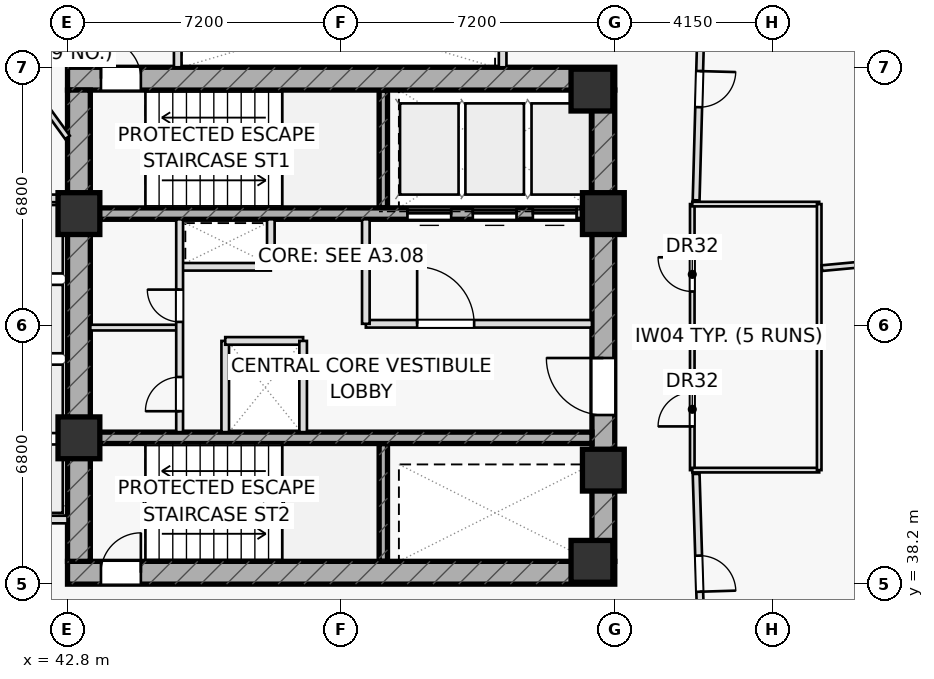
"""IFC4 building model, lengths in metres.
Left out: names, types, materials, properties, quantities, classifications, styles, units other than length and angle.
Written with IfcOpenShell. Run it as: python <this file> out.ifc"""

import sys

from ifc_helpers import new_model, si_unit, direction, frame, frame_2d, origin, origin_2d, place, context, subcontext, project, spatial, rectangle, extrude, element, fill, save


model = new_model("IFC4")
c1 = context("Model", 3, precision=1e-05, world=origin(), true_north=direction((0.0, 1.0)))
c2 = subcontext(c1, "Body", "Model", "MODEL_VIEW")
j1 = project(units=[si_unit("LENGTHUNIT", "METRE"), si_unit("PLANEANGLEUNIT", "RADIAN")], contexts=[c1])
p1 = place(None, origin())
s1 = spatial("IfcSite", under=j1, at=p1, CompositionType="ELEMENT")
p2 = place(p1, origin())
s2 = spatial("IfcBuilding", under=s1, at=p2, CompositionType="ELEMENT")
p3 = place(p2, frame((0.0, 0.0, 62.7)))
s3 = spatial("IfcBuildingStorey", under=s2, at=p3, CompositionType="ELEMENT", Elevation=62.7)
for number, where, z_axis, x_axis in (
    (1, (51.11, 48.1, 0.0), (0.0, 0.0, 1.0), (0.0, 1.0, 0.0)),
    (2, (51.11, 38.8, 0.0), (0.0, 0.0, 1.0), (0.0, 1.0, 0.0)),
):
    element("IfcWall", number, at=place(p3, frame(where, z_axis=z_axis, x_axis=x_axis)), inside=s3, PredefinedType="SHEAR", context=c2, shape_type="SweptSolid", body=[
        extrude(rectangle(XDim=3.1, YDim=0.22, at=frame_2d((1.55, 0.0))), origin(), (0.0, 0.0, 1.0), 3.6),
    ])
p4 = place(p3, frame((42.8, 51.5, 0.0), z_axis=(0.0, 0.0, 1.0), x_axis=(1.0, 0.0, 0.0)))
e3 = element("IfcWall", 3, at=p4, inside=s3, PredefinedType="SHEAR", context=c2, shape_type="SweptSolid", body=[
    extrude(rectangle(XDim=14.4, YDim=0.6, at=frame_2d((7.2, 0.0))), origin(), (0.0, 0.0, 1.0), 3.6),
])
p5 = place(p4, frame((0.88, 0.0, 0.0)))
e4 = element("IfcOpeningElement", 4, at=p5, cuts=e3, PredefinedType="OPENING", context=c2, shape_type="SweptSolid", body=[
    extrude(rectangle(XDim=1.05, YDim=2.2, at=frame_2d((0.525, 1.1))), frame((0.0, 0.31, 0.0), z_axis=(0.0, -1.0, 0.0), x_axis=(1.0, 0.0, 0.0)), (0.0, 0.0, 1.0), 0.62),
])
p6 = place(p3, frame((42.8, 38.5, 0.0), z_axis=(0.0, 0.0, 1.0), x_axis=(1.0, 0.0, 0.0)))
e5 = element("IfcWall", 5, at=p6, inside=s3, PredefinedType="SHEAR", context=c2, shape_type="SweptSolid", body=[
    extrude(rectangle(XDim=14.4, YDim=0.6, at=frame_2d((7.2, 0.0))), origin(), (0.0, 0.0, 1.0), 3.6),
])
p7 = place(p6, frame((0.88, 0.0, 0.0)))
e6 = element("IfcOpeningElement", 6, at=p7, cuts=e5, PredefinedType="OPENING", context=c2, shape_type="SweptSolid", body=[
    extrude(rectangle(XDim=1.05, YDim=2.2, at=frame_2d((0.525, 1.1))), frame((0.0, 0.31, 0.0), z_axis=(0.0, -1.0, 0.0), x_axis=(1.0, 0.0, 0.0)), (0.0, 0.0, 1.0), 0.62),
])
p8 = place(p3, frame((43.1, 38.8, 0.0), z_axis=(0.0, 0.0, 1.0), x_axis=(0.0, 1.0, 0.0)))
e7 = element("IfcWall", 7, at=p8, inside=s3, PredefinedType="SHEAR", context=c2, shape_type="SweptSolid", body=[
    extrude(rectangle(XDim=12.4, YDim=0.6, at=frame_2d((6.2, 0.0))), origin(), (0.0, 0.0, 1.0), 3.6),
])
p9 = place(p3, frame((56.9, 38.8, 0.0), z_axis=(0.0, 0.0, 1.0), x_axis=(0.0, 1.0, 0.0)))
e8 = element("IfcWall", 8, at=p9, inside=s3, PredefinedType="SHEAR", context=c2, shape_type="SweptSolid", body=[
    extrude(rectangle(XDim=12.4, YDim=0.6, at=frame_2d((6.2, 0.0))), origin(), (0.0, 0.0, 1.0), 3.6),
])
p10 = place(p9, frame((3.85, 0.0, 0.0)))
e9 = element("IfcOpeningElement", 9, at=p10, cuts=e8, PredefinedType="OPENING", context=c2, shape_type="SweptSolid", body=[
    extrude(rectangle(XDim=1.5, YDim=2.2, at=frame_2d((0.75, 1.1))), frame((0.0, 0.31, 0.0), z_axis=(0.0, -1.0, 0.0), x_axis=(1.0, 0.0, 0.0)), (0.0, 0.0, 1.0), 0.62),
])
p11 = place(p3, frame((43.4, 47.95, 0.0), z_axis=(0.0, 0.0, 1.0), x_axis=(1.0, 0.0, 0.0)))
e10 = element("IfcWall", 10, at=p11, inside=s3, PredefinedType="SHEAR", context=c2, shape_type="SweptSolid", body=[
    extrude(rectangle(XDim=13.2, YDim=0.3, at=frame_2d((6.6, 0.0))), origin(), (0.0, 0.0, 1.0), 3.6),
])
p12 = place(p11, frame((8.345, 0.0, 0.0)))
e11 = element("IfcOpeningElement", 11, at=p12, cuts=e10, PredefinedType="OPENING", context=c2, shape_type="SweptSolid", body=[
    extrude(rectangle(XDim=1.15, YDim=2.2, at=frame_2d((0.575, 1.1))), frame((0.0, 0.16, 0.0), z_axis=(0.0, -1.0, 0.0), x_axis=(1.0, 0.0, 0.0)), (0.0, 0.0, 1.0), 0.32),
])
p13 = place(p11, frame((10.065, 0.0, 0.0)))
e12 = element("IfcOpeningElement", 12, at=p13, cuts=e10, PredefinedType="OPENING", context=c2, shape_type="SweptSolid", body=[
    extrude(rectangle(XDim=1.15, YDim=2.2, at=frame_2d((0.575, 1.1))), frame((0.0, 0.16, 0.0), z_axis=(0.0, -1.0, 0.0), x_axis=(1.0, 0.0, 0.0)), (0.0, 0.0, 1.0), 0.32),
])
p14 = place(p11, frame((11.645, 0.0, 0.0)))
e13 = element("IfcOpeningElement", 13, at=p14, cuts=e10, PredefinedType="OPENING", context=c2, shape_type="SweptSolid", body=[
    extrude(rectangle(XDim=1.15, YDim=2.2, at=frame_2d((0.575, 1.1))), frame((0.0, 0.16, 0.0), z_axis=(0.0, -1.0, 0.0), x_axis=(1.0, 0.0, 0.0)), (0.0, 0.0, 1.0), 0.32),
])
p15 = place(p3, frame((43.4, 42.05, 0.0), z_axis=(0.0, 0.0, 1.0), x_axis=(1.0, 0.0, 0.0)))
e14 = element("IfcWall", 14, at=p15, inside=s3, PredefinedType="SHEAR", context=c2, shape_type="SweptSolid", body=[
    extrude(rectangle(XDim=13.2, YDim=0.3, at=frame_2d((6.6, 0.0))), origin(), (0.0, 0.0, 1.0), 3.6),
])
for number, where, z_axis, x_axis in (
    (15, (43.1, 47.95, 0.0), (0.0, 0.0, 1.0), (1.0, 0.0, 0.0)),
    (16, (56.9, 47.95, 0.0), (0.0, 0.0, 1.0), (1.0, 0.0, 0.0)),
    (17, (56.6, 51.2, 0.0), (0.0, 0.0, 1.0), (1.0, 0.0, 0.0)),
    (18, (43.1, 42.05, 0.0), (0.0, 0.0, 1.0), (1.0, 0.0, 0.0)),
    (19, (56.9, 41.2, 0.0), (0.0, 0.0, 1.0), (1.0, 0.0, 0.0)),
    (20, (56.6, 38.8, 0.0), (0.0, 0.0, 1.0), (1.0, 0.0, 0.0)),
):
    element("IfcColumn", number, at=place(p3, frame(where, z_axis=z_axis, x_axis=x_axis)), inside=s3, PredefinedType="COLUMN", context=c2, shape_type="SweptSolid", body=[
        extrude(rectangle(XDim=1.1, YDim=1.1, at=origin_2d()), origin(), (0.0, 0.0, 1.0), 3.6),
    ])
for number, where, z_axis, x_axis in (
    (21, (40.3, 39.9, 0.0), (0.0, 0.0, 1.0), (1.0, 0.0, 0.0)),
    (22, (40.3, 48.35, 0.0), (0.0, 0.0, 1.0), (1.0, 0.0, 0.0)),
    (23, (45.7, 51.8, 0.0), (0.0, 0.0, 1.0), (0.0, 1.0, 0.0)),
    (24, (54.25, 51.8, 0.0), (0.0, 0.0, 1.0), (0.0, 1.0, 0.0)),
):
    element("IfcWall", number, at=place(p3, frame(where, z_axis=z_axis, x_axis=x_axis)), inside=s3, PredefinedType="PARTITIONING", context=c2, shape_type="SweptSolid", body=[
        extrude(rectangle(XDim=2.5, YDim=0.2, at=frame_2d((1.25, 0.0))), origin(), (0.0, 0.0, 1.0), 3.6),
    ])
p16 = place(p3, frame((45.75, 46.55, 0.0), z_axis=(0.0, 0.0, 1.0), x_axis=(1.0, 0.0, 0.0)))
e25 = element("IfcWall", 25, at=p16, inside=s3, PredefinedType="PARTITIONING", context=c2, shape_type="SweptSolid", body=[
    extrude(rectangle(XDim=2.4, YDim=0.2, at=frame_2d((1.2, 0.0))), origin(), (0.0, 0.0, 1.0), 3.6),
])
p17 = place(p3, frame((48.15, 46.55, 0.0), z_axis=(0.0, 0.0, 1.0), x_axis=(0.0, 1.0, 0.0)))
e26 = element("IfcWall", 26, at=p17, inside=s3, PredefinedType="PARTITIONING", context=c2, shape_type="SweptSolid", body=[
    extrude(rectangle(XDim=1.25, YDim=0.2, at=frame_2d((0.625, 0.0))), origin(), (0.0, 0.0, 1.0), 3.6),
])
p18 = place(p3, frame((46.95, 42.2, 0.0), z_axis=(0.0, 0.0, 1.0), x_axis=(0.0, 1.0, 0.0)))
e27 = element("IfcWall", 27, at=p18, inside=s3, PredefinedType="PARTITIONING", context=c2, shape_type="SweptSolid", body=[
    extrude(rectangle(XDim=2.4, YDim=0.2, at=frame_2d((1.2, 0.0))), origin(), (0.0, 0.0, 1.0), 3.6),
])
p19 = place(p3, frame((46.95, 44.6, 0.0), z_axis=(0.0, 0.0, 1.0), x_axis=(1.0, 0.0, 0.0)))
e28 = element("IfcWall", 28, at=p19, inside=s3, PredefinedType="PARTITIONING", context=c2, shape_type="SweptSolid", body=[
    extrude(rectangle(XDim=2.05, YDim=0.2, at=frame_2d((1.025, 0.0))), origin(), (0.0, 0.0, 1.0), 3.6),
])
p20 = place(p3, frame((50.65, 45.05, 0.0), z_axis=(0.0, 0.0, 1.0), x_axis=(1.0, 0.0, 0.0)))
e29 = element("IfcWall", 29, at=p20, inside=s3, PredefinedType="PARTITIONING", context=c2, shape_type="SweptSolid", body=[
    extrude(rectangle(XDim=5.95, YDim=0.2, at=frame_2d((2.975, 0.0))), origin(), (0.0, 0.0, 1.0), 3.6),
])
p21 = place(p20, frame((1.35, 0.0, 0.0)))
e30 = element("IfcOpeningElement", 30, at=p21, cuts=e29, PredefinedType="OPENING", context=c2, shape_type="SweptSolid", body=[
    extrude(rectangle(XDim=1.5, YDim=2.2, at=frame_2d((0.75, 1.1))), frame((0.0, 0.11, 0.0), z_axis=(0.0, -1.0, 0.0), x_axis=(1.0, 0.0, 0.0)), (0.0, 0.0, 1.0), 0.22),
])
p22 = place(p3, frame((50.65, 45.05, 0.0), z_axis=(0.0, 0.0, 1.0), x_axis=(0.0, 1.0, 0.0)))
e31 = element("IfcWall", 31, at=p22, inside=s3, PredefinedType="PARTITIONING", context=c2, shape_type="SweptSolid", body=[
    extrude(rectangle(XDim=2.75, YDim=0.2, at=frame_2d((1.375, 0.0))), origin(), (0.0, 0.0, 1.0), 3.6),
])
p23 = place(p3, frame((43.4, 44.95, 0.0), z_axis=(0.0, 0.0, 1.0), x_axis=(1.0, 0.0, 0.0)))
e32 = element("IfcWall", 32, at=p23, inside=s3, PredefinedType="PARTITIONING", context=c2, shape_type="SweptSolid", body=[
    extrude(rectangle(XDim=2.35, YDim=0.15, at=frame_2d((1.175, 0.0))), origin(), (0.0, 0.0, 1.0), 3.6),
])
p24 = place(p3, frame((45.75, 42.2, 0.0), z_axis=(0.0, 0.0, 1.0), x_axis=(0.0, 1.0, 0.0)))
e33 = element("IfcWall", 33, at=p24, inside=s3, PredefinedType="PARTITIONING", context=c2, shape_type="SweptSolid", body=[
    extrude(rectangle(XDim=5.6, YDim=0.18, at=frame_2d((2.8, 0.0))), origin(), (0.0, 0.0, 1.0), 3.6),
])
p25 = place(p24, frame((0.55, 0.0, 0.0)))
e34 = element("IfcOpeningElement", 34, at=p25, cuts=e33, PredefinedType="OPENING", context=c2, shape_type="SweptSolid", body=[
    extrude(rectangle(XDim=0.9, YDim=2.05, at=frame_2d((0.45, 1.025))), frame((0.0, 0.1, 0.0), z_axis=(0.0, -1.0, 0.0), x_axis=(1.0, 0.0, 0.0)), (0.0, 0.0, 1.0), 0.2),
])
p26 = place(p24, frame((2.9, 0.0, 0.0)))
e35 = element("IfcOpeningElement", 35, at=p26, cuts=e33, PredefinedType="OPENING", context=c2, shape_type="SweptSolid", body=[
    extrude(rectangle(XDim=0.85, YDim=2.05, at=frame_2d((0.425, 1.025))), frame((0.0, 0.1, 0.0), z_axis=(0.0, -1.0, 0.0), x_axis=(1.0, 0.0, 0.0)), (0.0, 0.0, 1.0), 0.2),
])
p27 = place(p3, frame((59.24, 41.2, 0.0), z_axis=(0.0, 0.0, 1.0), x_axis=(0.0, 1.0, 0.0)))
e36 = element("IfcWall", 36, at=p27, inside=s3, PredefinedType="PARTITIONING", context=c2, shape_type="SweptSolid", body=[
    extrude(rectangle(XDim=7.0, YDim=0.12, at=frame_2d((3.5, 0.0))), origin(), (0.0, 0.0, 1.0), 3.6),
])
p28 = place(p27, frame((1.15, 0.0, 0.0)))
e37 = element("IfcOpeningElement", 37, at=p28, cuts=e36, PredefinedType="OPENING", context=c2, shape_type="SweptSolid", body=[
    extrude(rectangle(XDim=0.9, YDim=2.05, at=frame_2d((0.45, 1.025))), frame((0.0, 0.07, 0.0), z_axis=(0.0, -1.0, 0.0), x_axis=(1.0, 0.0, 0.0)), (0.0, 0.0, 1.0), 0.14),
])
p29 = place(p27, frame((4.7, 0.0, 0.0)))
e38 = element("IfcOpeningElement", 38, at=p29, cuts=e36, PredefinedType="OPENING", context=c2, shape_type="SweptSolid", body=[
    extrude(rectangle(XDim=0.9, YDim=2.05, at=frame_2d((0.45, 1.025))), frame((0.0, 0.07, 0.0), z_axis=(0.0, -1.0, 0.0), x_axis=(1.0, 0.0, 0.0)), (0.0, 0.0, 1.0), 0.14),
])
p30 = place(p3, frame((59.24, 41.2, 0.0), z_axis=(0.0, 0.0, 1.0), x_axis=(1.0, 0.0, 0.0)))
e39 = element("IfcWall", 39, at=p30, inside=s3, PredefinedType="PARTITIONING", context=c2, shape_type="SweptSolid", body=[
    extrude(rectangle(XDim=3.34, YDim=0.12, at=frame_2d((1.67, 0.0))), origin(), (0.0, 0.0, 1.0), 2.975),
])
for number, where, z_axis, x_axis in (
    (40, (59.24, 44.65, 0.0), (0.0, 0.0, 1.0), (1.0, 0.0, 0.0)),
    (41, (59.24, 48.2, 0.0), (0.0, 0.0, 1.0), (1.0, 0.0, 0.0)),
):
    element("IfcWall", number, at=place(p3, frame(where, z_axis=z_axis, x_axis=x_axis)), inside=s3, PredefinedType="PARTITIONING", context=c2, shape_type="SweptSolid", body=[
        extrude(rectangle(XDim=3.34, YDim=0.12, at=frame_2d((1.67, 0.0))), origin(), (0.0, 0.0, 1.0), 3.6),
    ])
p31 = place(p3, frame((62.58, 41.2, 0.0), z_axis=(0.0, 0.0, 1.0), x_axis=(0.0, 1.0, 0.0)))
e42 = element("IfcWall", 42, at=p31, inside=s3, PredefinedType="PARTITIONING", context=c2, shape_type="SweptSolid", body=[
    extrude(rectangle(XDim=7.0, YDim=0.12, at=frame_2d((3.5, 0.0))), origin(), (0.0, 0.0, 1.0), 3.6),
])
p32 = place(p3, frame((42.8, 49.955, 0.0), z_axis=(0.0, 0.0, 1.0), x_axis=(-0.587790891167, 0.809012897463, 0.0)))
e43 = element("IfcWall", 43, at=p32, inside=s3, PredefinedType="PARTITIONING", context=c2, shape_type="SweptSolid", body=[
    extrude(rectangle(XDim=19.979, YDim=0.15, at=frame_2d((9.989, 0.0))), origin(), (0.0, 0.0, 1.0), 2.975),
])
p33 = place(p32, frame((1.35, 0.0, 0.0)))
e44 = element("IfcOpeningElement", 44, at=p33, cuts=e43, PredefinedType="OPENING", context=c2, shape_type="SweptSolid", body=[
    extrude(rectangle(XDim=0.95, YDim=2.05, at=frame_2d((0.475, 1.025))), frame((0.0, 0.085, 0.0), z_axis=(0.0, -1.0, 0.0), x_axis=(1.0, 0.0, 0.0)), (0.0, 0.0, 1.0), 0.17),
])
p34 = place(p3, frame((62.65, 46.515, 0.0), z_axis=(0.0, 0.0, 1.0), x_axis=(0.995682440143, 0.092824987962, 0.0)))
e45 = element("IfcWall", 45, at=p34, inside=s3, PredefinedType="PARTITIONING", context=c2, shape_type="SweptSolid", body=[
    extrude(rectangle(XDim=10.442, YDim=0.15, at=frame_2d((5.221, 0.0))), origin(), (0.0, 0.0, 1.0), 3.025),
])
p35 = place(p3, frame((59.501, 54.15, 0.0), z_axis=(0.0, 0.0, 1.0), x_axis=(-0.027367567602, -0.999625437973, 0.0)))
e46 = element("IfcWall", 46, at=p35, inside=s3, PredefinedType="PARTITIONING", context=c2, shape_type="SweptSolid", body=[
    extrude(rectangle(XDim=5.852, YDim=0.18, at=frame_2d((2.926, 0.0))), origin(), (0.0, 0.0, 1.0), 2.975),
])
p36 = place(p35, frame((2.451, 0.0, 0.0)))
e47 = element("IfcOpeningElement", 47, at=p36, cuts=e46, PredefinedType="OPENING", context=c2, shape_type="SweptSolid", body=[
    extrude(rectangle(XDim=0.95, YDim=2.05, at=frame_2d((0.475, 1.025))), frame((0.0, 0.1, 0.0), z_axis=(0.0, -1.0, 0.0), x_axis=(1.0, 0.0, 0.0)), (0.0, 0.0, 1.0), 0.2),
])
p37 = place(p3, frame((59.342, 41.1, 0.0), z_axis=(0.0, 0.0, 1.0), x_axis=(0.030445329425, -0.999536433511, 0.0)))
e48 = element("IfcWall", 48, at=p37, inside=s3, PredefinedType="PARTITIONING", context=c2, shape_type="SweptSolid", body=[
    extrude(rectangle(XDim=5.252, YDim=0.18, at=frame_2d((2.626, 0.0))), origin(), (0.0, 0.0, 1.0), 2.975),
])
p38 = place(p37, frame((2.151, 0.0, 0.0)))
e49 = element("IfcOpeningElement", 49, at=p38, cuts=e48, PredefinedType="OPENING", context=c2, shape_type="SweptSolid", body=[
    extrude(rectangle(XDim=0.95, YDim=2.05, at=frame_2d((0.475, 1.025))), frame((0.0, 0.1, 0.0), z_axis=(0.0, -1.0, 0.0), x_axis=(1.0, 0.0, 0.0)), (0.0, 0.0, 1.0), 0.2),
])
p39 = place(p3, frame((49.0, 42.2, 0.0), z_axis=(0.0, 0.0, 1.0), x_axis=(0.0, 1.0, 0.0)))
e50 = element("IfcWall", 50, at=p39, inside=s3, PredefinedType="PARTITIONING", context=c2, shape_type="SweptSolid", body=[
    extrude(rectangle(XDim=2.4, YDim=0.2, at=frame_2d((1.2, 0.0))), origin(), (0.0, 0.0, 1.0), 3.6),
])
p40 = place(p5, origin())
e51 = element("IfcDoor", 51, at=p40, inside=s3, OperationType="SINGLE_SWING_LEFT", PredefinedType="DOOR", context=c2, shape_type="SweptSolid", body=[
    extrude(rectangle(XDim=1.05, YDim=2.2, at=frame_2d((0.525, 1.1))), frame((0.0, 0.025, 0.0), z_axis=(0.0, -1.0, 0.0), x_axis=(1.0, 0.0, 0.0)), (0.0, 0.0, 1.0), 0.05),
])
fill(e4, e51)
p41 = place(p7, origin())
e52 = element("IfcDoor", 52, at=p41, inside=s3, OperationType="SINGLE_SWING_RIGHT", PredefinedType="DOOR", context=c2, shape_type="SweptSolid", body=[
    extrude(rectangle(XDim=1.05, YDim=2.2, at=frame_2d((0.525, 1.1))), frame((0.0, 0.025, 0.0), z_axis=(0.0, -1.0, 0.0), x_axis=(1.0, 0.0, 0.0)), (0.0, 0.0, 1.0), 0.05),
])
fill(e6, e52)
p42 = place(p10, origin())
e53 = element("IfcDoor", 53, at=p42, inside=s3, OperationType="SINGLE_SWING_RIGHT", PredefinedType="DOOR", context=c2, shape_type="SweptSolid", body=[
    extrude(rectangle(XDim=1.5, YDim=2.2, at=frame_2d((0.75, 1.1))), frame((0.0, 0.025, 0.0), z_axis=(0.0, -1.0, 0.0), x_axis=(1.0, 0.0, 0.0)), (0.0, 0.0, 1.0), 0.05),
])
fill(e9, e53)
p43 = place(p21, origin())
e54 = element("IfcDoor", 54, at=p43, inside=s3, OperationType="SINGLE_SWING_LEFT", PredefinedType="DOOR", context=c2, shape_type="SweptSolid", body=[
    extrude(rectangle(XDim=1.5, YDim=2.2, at=frame_2d((0.75, 1.1))), frame((0.0, 0.025, 0.0), z_axis=(0.0, -1.0, 0.0), x_axis=(1.0, 0.0, 0.0)), (0.0, 0.0, 1.0), 0.05),
])
fill(e30, e54)
p44 = place(p25, origin())
e55 = element("IfcDoor", 55, at=p44, inside=s3, OperationType="SINGLE_SWING_LEFT", PredefinedType="DOOR", context=c2, shape_type="SweptSolid", body=[
    extrude(rectangle(XDim=0.9, YDim=2.05, at=frame_2d((0.45, 1.025))), frame((0.0, 0.025, 0.0), z_axis=(0.0, -1.0, 0.0), x_axis=(1.0, 0.0, 0.0)), (0.0, 0.0, 1.0), 0.05),
])
fill(e34, e55)
p45 = place(p26, origin())
e56 = element("IfcDoor", 56, at=p45, inside=s3, OperationType="SINGLE_SWING_RIGHT", PredefinedType="DOOR", context=c2, shape_type="SweptSolid", body=[
    extrude(rectangle(XDim=0.85, YDim=2.05, at=frame_2d((0.425, 1.025))), frame((0.0, 0.025, 0.0), z_axis=(0.0, -1.0, 0.0), x_axis=(1.0, 0.0, 0.0)), (0.0, 0.0, 1.0), 0.05),
])
fill(e35, e56)
p46 = place(p28, origin())
e57 = element("IfcDoor", 57, at=p46, inside=s3, OperationType="SINGLE_SWING_LEFT", PredefinedType="DOOR", context=c2, shape_type="SweptSolid", body=[
    extrude(rectangle(XDim=0.9, YDim=2.05, at=frame_2d((0.45, 1.025))), frame((0.0, 0.025, 0.0), z_axis=(0.0, -1.0, 0.0), x_axis=(1.0, 0.0, 0.0)), (0.0, 0.0, 1.0), 0.05),
])
fill(e37, e57)
p47 = place(p29, origin())
e58 = element("IfcDoor", 58, at=p47, inside=s3, OperationType="SINGLE_SWING_RIGHT", PredefinedType="DOOR", context=c2, shape_type="SweptSolid", body=[
    extrude(rectangle(XDim=0.9, YDim=2.05, at=frame_2d((0.45, 1.025))), frame((0.0, 0.025, 0.0), z_axis=(0.0, -1.0, 0.0), x_axis=(1.0, 0.0, 0.0)), (0.0, 0.0, 1.0), 0.05),
])
fill(e38, e58)
p48 = place(p36, origin())
e59 = element("IfcDoor", 59, at=p48, inside=s3, OperationType="SINGLE_SWING_LEFT", PredefinedType="DOOR", context=c2, shape_type="SweptSolid", body=[
    extrude(rectangle(XDim=0.95, YDim=2.05, at=frame_2d((0.475, 1.025))), frame((0.0, 0.025, 0.0), z_axis=(0.0, -1.0, 0.0), x_axis=(1.0, 0.0, 0.0)), (0.0, 0.0, 1.0), 0.05),
])
fill(e47, e59)
p49 = place(p38, origin())
e60 = element("IfcDoor", 60, at=p49, inside=s3, OperationType="SINGLE_SWING_RIGHT", PredefinedType="DOOR", context=c2, shape_type="SweptSolid", body=[
    extrude(rectangle(XDim=0.95, YDim=2.05, at=frame_2d((0.475, 1.025))), frame((0.0, 0.025, 0.0), z_axis=(0.0, -1.0, 0.0), x_axis=(1.0, 0.0, 0.0)), (0.0, 0.0, 1.0), 0.05),
])
fill(e49, e60)
p50 = place(p12, origin())
e61 = element("IfcDoor", 61, at=p50, inside=s3, OperationType="SLIDING_TO_LEFT", PredefinedType="DOOR", context=c2, shape_type="SweptSolid", body=[
    extrude(rectangle(XDim=1.15, YDim=2.2, at=frame_2d((0.575, 1.1))), frame((0.0, 0.025, 0.0), z_axis=(0.0, -1.0, 0.0), x_axis=(1.0, 0.0, 0.0)), (0.0, 0.0, 1.0), 0.05),
])
fill(e11, e61)
p51 = place(p13, origin())
e62 = element("IfcDoor", 62, at=p51, inside=s3, OperationType="SLIDING_TO_LEFT", PredefinedType="DOOR", context=c2, shape_type="SweptSolid", body=[
    extrude(rectangle(XDim=1.15, YDim=2.2, at=frame_2d((0.575, 1.1))), frame((0.0, 0.025, 0.0), z_axis=(0.0, -1.0, 0.0), x_axis=(1.0, 0.0, 0.0)), (0.0, 0.0, 1.0), 0.05),
])
fill(e12, e62)
p52 = place(p14, origin())
e63 = element("IfcDoor", 63, at=p52, inside=s3, OperationType="SLIDING_TO_LEFT", PredefinedType="DOOR", context=c2, shape_type="SweptSolid", body=[
    extrude(rectangle(XDim=1.15, YDim=2.2, at=frame_2d((0.575, 1.1))), frame((0.0, 0.025, 0.0), z_axis=(0.0, -1.0, 0.0), x_axis=(1.0, 0.0, 0.0)), (0.0, 0.0, 1.0), 0.05),
])
fill(e13, e63)
save(model, sys.argv[1])
